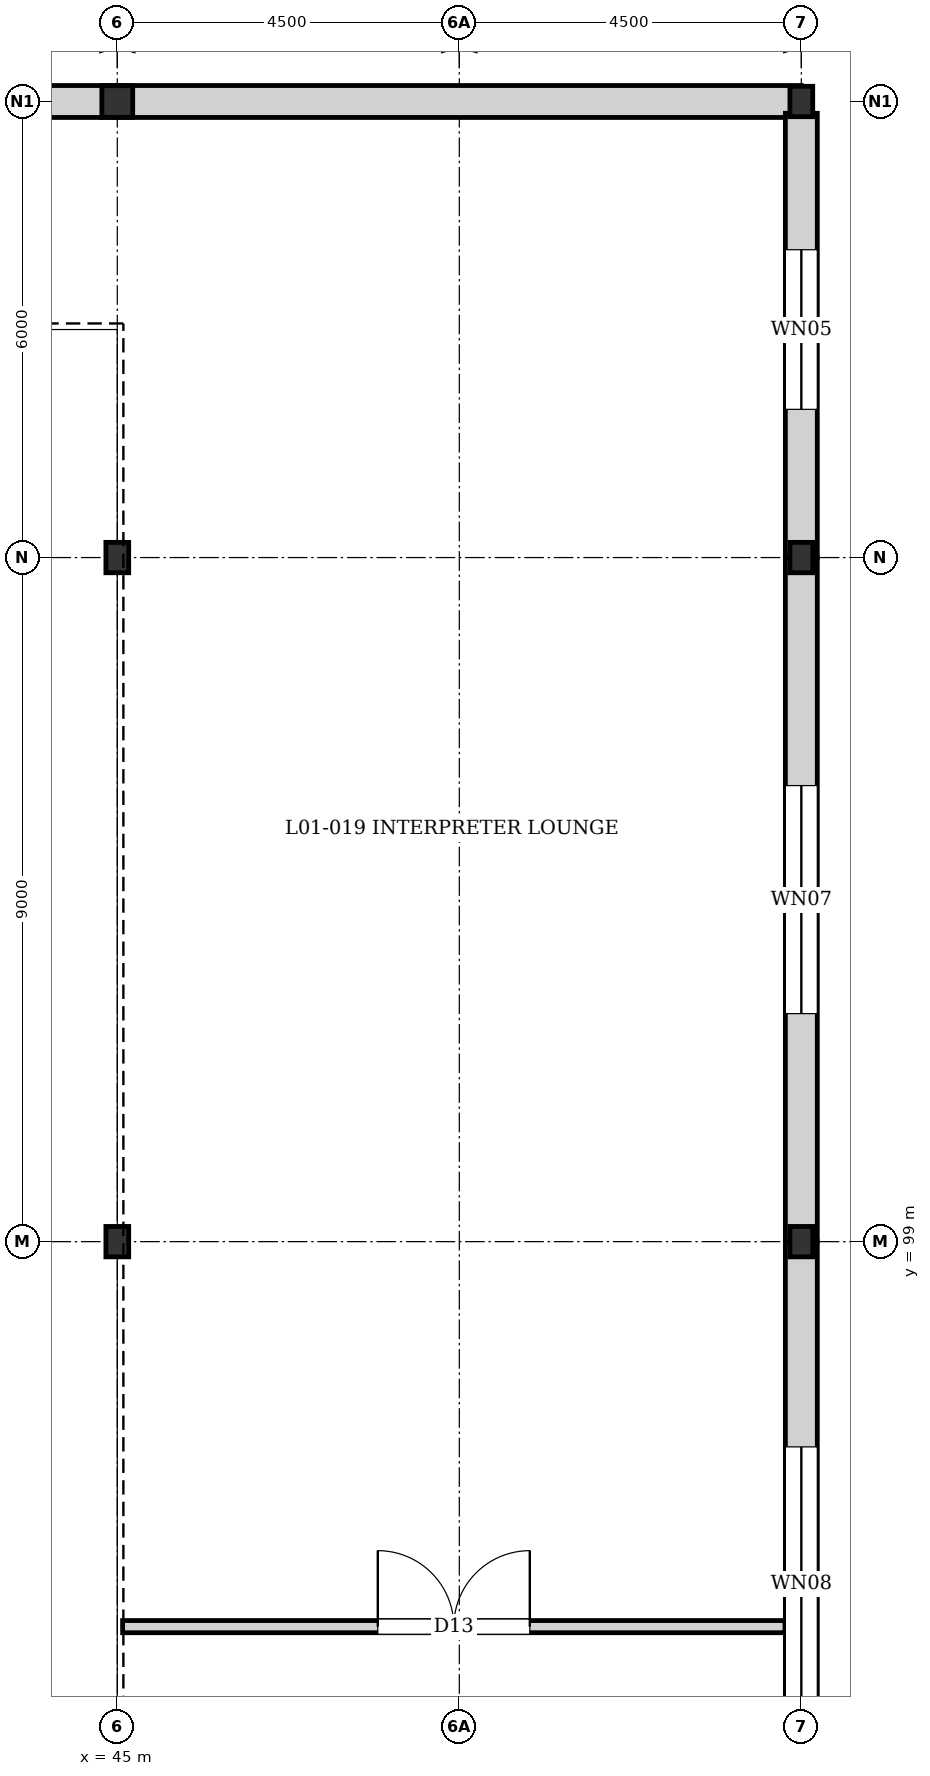
"""IFC4 building model, lengths in metres.
Left out: names, types, materials, properties, quantities, classifications, styles, units other than length and angle.
Written with IfcOpenShell. Run it as: python <this file> out.ifc"""

import sys

from ifc_helpers import new_model, si_unit, direction, frame, frame_2d, origin, origin_2d, place, context, subcontext, project, spatial, rectangle, i_section, extrude, element, fill, save


model = new_model("IFC4")
c1 = context("Model", 3, precision=1e-05, world=origin(), true_north=direction((0.0, 1.0)))
c2 = subcontext(c1, "Body", "Model", "MODEL_VIEW")
j1 = project(units=[si_unit("LENGTHUNIT", "METRE"), si_unit("PLANEANGLEUNIT", "RADIAN")], contexts=[c1])
p1 = place(None, origin())
s1 = spatial("IfcSite", under=j1, at=p1, CompositionType="ELEMENT")
p2 = place(p1, origin())
s2 = spatial("IfcBuilding", under=s1, at=p2, CompositionType="ELEMENT")
p3 = place(p2, frame((0.0, 0.0, 4.32)))
s3 = spatial("IfcBuildingStorey", under=s2, at=p3, CompositionType="ELEMENT", Elevation=4.32)
for number, where, z_axis, x_axis in (
    (1, (45.0, 99.0, 0.0), (0.0, 0.0, 1.0), (1.0, 0.0, 0.0)),
    (2, (45.0, 108.0, 0.0), (0.0, 0.0, 1.0), (1.0, 0.0, 0.0)),
):
    element("IfcColumn", number, at=place(p3, frame(where, z_axis=z_axis, x_axis=x_axis)), inside=s3, PredefinedType="COLUMN", context=c2, shape_type="SweptSolid", body=[
        extrude(i_section(OverallWidth=0.3, OverallDepth=0.4, WebThickness=0.013, FlangeThickness=0.024, at=origin_2d()), origin(), (0.0, 0.0, 1.0), 3.84),
    ])
p4 = place(p3, frame((45.0, 114.0, 0.0), z_axis=(0.0, 0.0, 1.0), x_axis=(1.0, 0.0, 0.0)))
e3 = element("IfcColumn", 3, at=p4, inside=s3, PredefinedType="COLUMN", context=c2, shape_type="SweptSolid", body=[
    extrude(i_section(OverallWidth=0.406, OverallDepth=0.416, WebThickness=0.022, FlangeThickness=0.038, at=origin_2d()), origin(), (0.0, 0.0, 1.0), 3.84),
])
for number, where, z_axis, x_axis in (
    (4, (54.0, 99.0, 0.0), (0.0, 0.0, 1.0), (1.0, 0.0, 0.0)),
    (5, (54.0, 108.0, 0.0), (0.0, 0.0, 1.0), (1.0, 0.0, 0.0)),
    (6, (54.0, 114.0, 0.0), (0.0, 0.0, 1.0), (1.0, 0.0, 0.0)),
):
    element("IfcColumn", number, at=place(p3, frame(where, z_axis=z_axis, x_axis=x_axis)), inside=s3, PredefinedType="COLUMN", context=c2, shape_type="SweptSolid", body=[
        extrude(i_section(OverallWidth=0.3, OverallDepth=0.4, WebThickness=0.013, FlangeThickness=0.024, at=origin_2d()), origin(), (0.0, 0.0, 1.0), 3.84),
    ])
p5 = place(p3, frame((36.0, 114.0, 0.0), z_axis=(0.0, 0.0, 1.0), x_axis=(1.0, 0.0, 0.0)))
e7 = element("IfcWall", 7, at=p5, inside=s3, PredefinedType="SOLIDWALL", context=c2, shape_type="SweptSolid", body=[
    extrude(rectangle(XDim=9.0, YDim=0.42, at=frame_2d((4.5, 0.0))), origin(), (0.0, 0.0, 1.0), 3.18),
])
p6 = place(p3, frame((45.0, 114.0, 0.0), z_axis=(0.0, 0.0, 1.0), x_axis=(1.0, 0.0, 0.0)))
e8 = element("IfcWall", 8, at=p6, inside=s3, PredefinedType="SOLIDWALL", context=c2, shape_type="SweptSolid", body=[
    extrude(rectangle(XDim=9.0, YDim=0.42, at=frame_2d((4.5, 0.0))), origin(), (0.0, 0.0, 1.0), 3.35),
])
p7 = place(p3, frame((54.0, 113.845, 0.0), z_axis=(0.0, 0.0, 1.0), x_axis=(0.0, -1.0, 0.0)))
e9 = element("IfcWall", 9, at=p7, inside=s3, PredefinedType="SOLIDWALL", context=c2, shape_type="SweptSolid", body=[
    extrude(rectangle(XDim=5.845, YDim=0.42, at=frame_2d((2.922, 0.0))), origin(), (0.0, 0.0, 1.0), 3.6),
])
p8 = place(p7, frame((1.795, 0.0, 0.4)))
e10 = element("IfcOpeningElement", 10, at=p8, cuts=e9, PredefinedType="OPENING", context=c2, shape_type="SweptSolid", body=[
    extrude(rectangle(XDim=2.1, YDim=1.95, at=frame_2d((1.05, 0.975))), frame((0.0, 0.22, 0.0), z_axis=(0.0, -1.0, 0.0), x_axis=(1.0, 0.0, 0.0)), (0.0, 0.0, 1.0), 0.44),
])
p9 = place(p3, frame((54.0, 108.0, 0.0), z_axis=(0.0, 0.0, 1.0), x_axis=(0.0, -1.0, 0.0)))
e11 = element("IfcWall", 11, at=p9, inside=s3, PredefinedType="SOLIDWALL", context=c2, shape_type="SweptSolid", body=[
    extrude(rectangle(XDim=9.0, YDim=0.42, at=frame_2d((4.5, 0.0))), origin(), (0.0, 0.0, 1.0), 3.18),
])
p10 = place(p9, frame((3.0, 0.0, 0.4)))
e12 = element("IfcOpeningElement", 12, at=p10, cuts=e11, PredefinedType="OPENING", context=c2, shape_type="SweptSolid", body=[
    extrude(rectangle(XDim=3.0, YDim=2.2, at=frame_2d((1.5, 1.1))), frame((0.0, 0.22, 0.0), z_axis=(0.0, -1.0, 0.0), x_axis=(1.0, 0.0, 0.0)), (0.0, 0.0, 1.0), 0.44),
])
p11 = place(p3, frame((54.0, 99.0, 0.0), z_axis=(0.0, 0.0, 1.0), x_axis=(0.0, -1.0, 0.0)))
e13 = element("IfcWall", 13, at=p11, inside=s3, PredefinedType="SOLIDWALL", context=c2, shape_type="SweptSolid", body=[
    extrude(rectangle(XDim=8.87, YDim=0.42, at=frame_2d((4.435, 0.0))), origin(), (0.0, 0.0, 1.0), 3.22),
])
p12 = place(p11, frame((2.7, 0.0, 0.4)))
e14 = element("IfcOpeningElement", 14, at=p12, cuts=e13, PredefinedType="OPENING", context=c2, shape_type="SweptSolid", body=[
    extrude(rectangle(XDim=3.6, YDim=2.2, at=frame_2d((1.8, 1.1))), frame((0.0, 0.22, 0.0), z_axis=(0.0, -1.0, 0.0), x_axis=(1.0, 0.0, 0.0)), (0.0, 0.0, 1.0), 0.44),
])
p13 = place(p3, frame((45.07, 93.935, 0.0), z_axis=(0.0, 0.0, 1.0), x_axis=(1.0, 0.0, 0.0)))
e15 = element("IfcWall", 15, at=p13, inside=s3, PredefinedType="PARTITIONING", context=c2, shape_type="SweptSolid", body=[
    extrude(rectangle(XDim=8.715, YDim=0.16, at=frame_2d((4.357, 0.0))), origin(), (0.0, 0.0, 1.0), 3.6),
])
p14 = place(p13, frame((3.357, 0.0, 0.0)))
e16 = element("IfcOpeningElement", 16, at=p14, cuts=e15, PredefinedType="OPENING", context=c2, shape_type="SweptSolid", body=[
    extrude(rectangle(XDim=2.0, YDim=2.35, at=frame_2d((1.0, 1.175))), frame((0.0, 0.09, 0.0), z_axis=(0.0, -1.0, 0.0), x_axis=(1.0, 0.0, 0.0)), (0.0, 0.0, 1.0), 0.18),
])
p15 = place(p8, origin())
e17 = element("IfcWindow", 17, at=p15, inside=s3, PartitioningType="SINGLE_PANEL", PredefinedType="WINDOW", context=c2, shape_type="SweptSolid", body=[
    extrude(rectangle(XDim=2.1, YDim=1.95, at=frame_2d((1.05, 0.975))), frame((0.0, 0.03, 0.0), z_axis=(0.0, -1.0, 0.0), x_axis=(1.0, 0.0, 0.0)), (0.0, 0.0, 1.0), 0.06),
])
fill(e10, e17)
p16 = place(p10, origin())
e18 = element("IfcWindow", 18, at=p16, inside=s3, PartitioningType="SINGLE_PANEL", PredefinedType="WINDOW", context=c2, shape_type="SweptSolid", body=[
    extrude(rectangle(XDim=3.0, YDim=2.2, at=frame_2d((1.5, 1.1))), frame((0.0, 0.03, 0.0), z_axis=(0.0, -1.0, 0.0), x_axis=(1.0, 0.0, 0.0)), (0.0, 0.0, 1.0), 0.06),
])
fill(e12, e18)
p17 = place(p12, origin())
e19 = element("IfcWindow", 19, at=p17, inside=s3, PartitioningType="SINGLE_PANEL", PredefinedType="WINDOW", context=c2, shape_type="SweptSolid", body=[
    extrude(rectangle(XDim=3.6, YDim=2.2, at=frame_2d((1.8, 1.1))), frame((0.0, 0.03, 0.0), z_axis=(0.0, -1.0, 0.0), x_axis=(1.0, 0.0, 0.0)), (0.0, 0.0, 1.0), 0.06),
])
fill(e14, e19)
p18 = place(p14, origin())
e20 = element("IfcDoor", 20, at=p18, inside=s3, OperationType="DOUBLE_DOOR_SINGLE_SWING", PredefinedType="DOOR", context=c2, shape_type="SweptSolid", body=[
    extrude(rectangle(XDim=2.0, YDim=2.35, at=frame_2d((1.0, 1.175))), frame((0.0, 0.025, 0.0), z_axis=(0.0, -1.0, 0.0), x_axis=(1.0, 0.0, 0.0)), (0.0, 0.0, 1.0), 0.05),
])
fill(e16, e20)
save(model, sys.argv[1])
